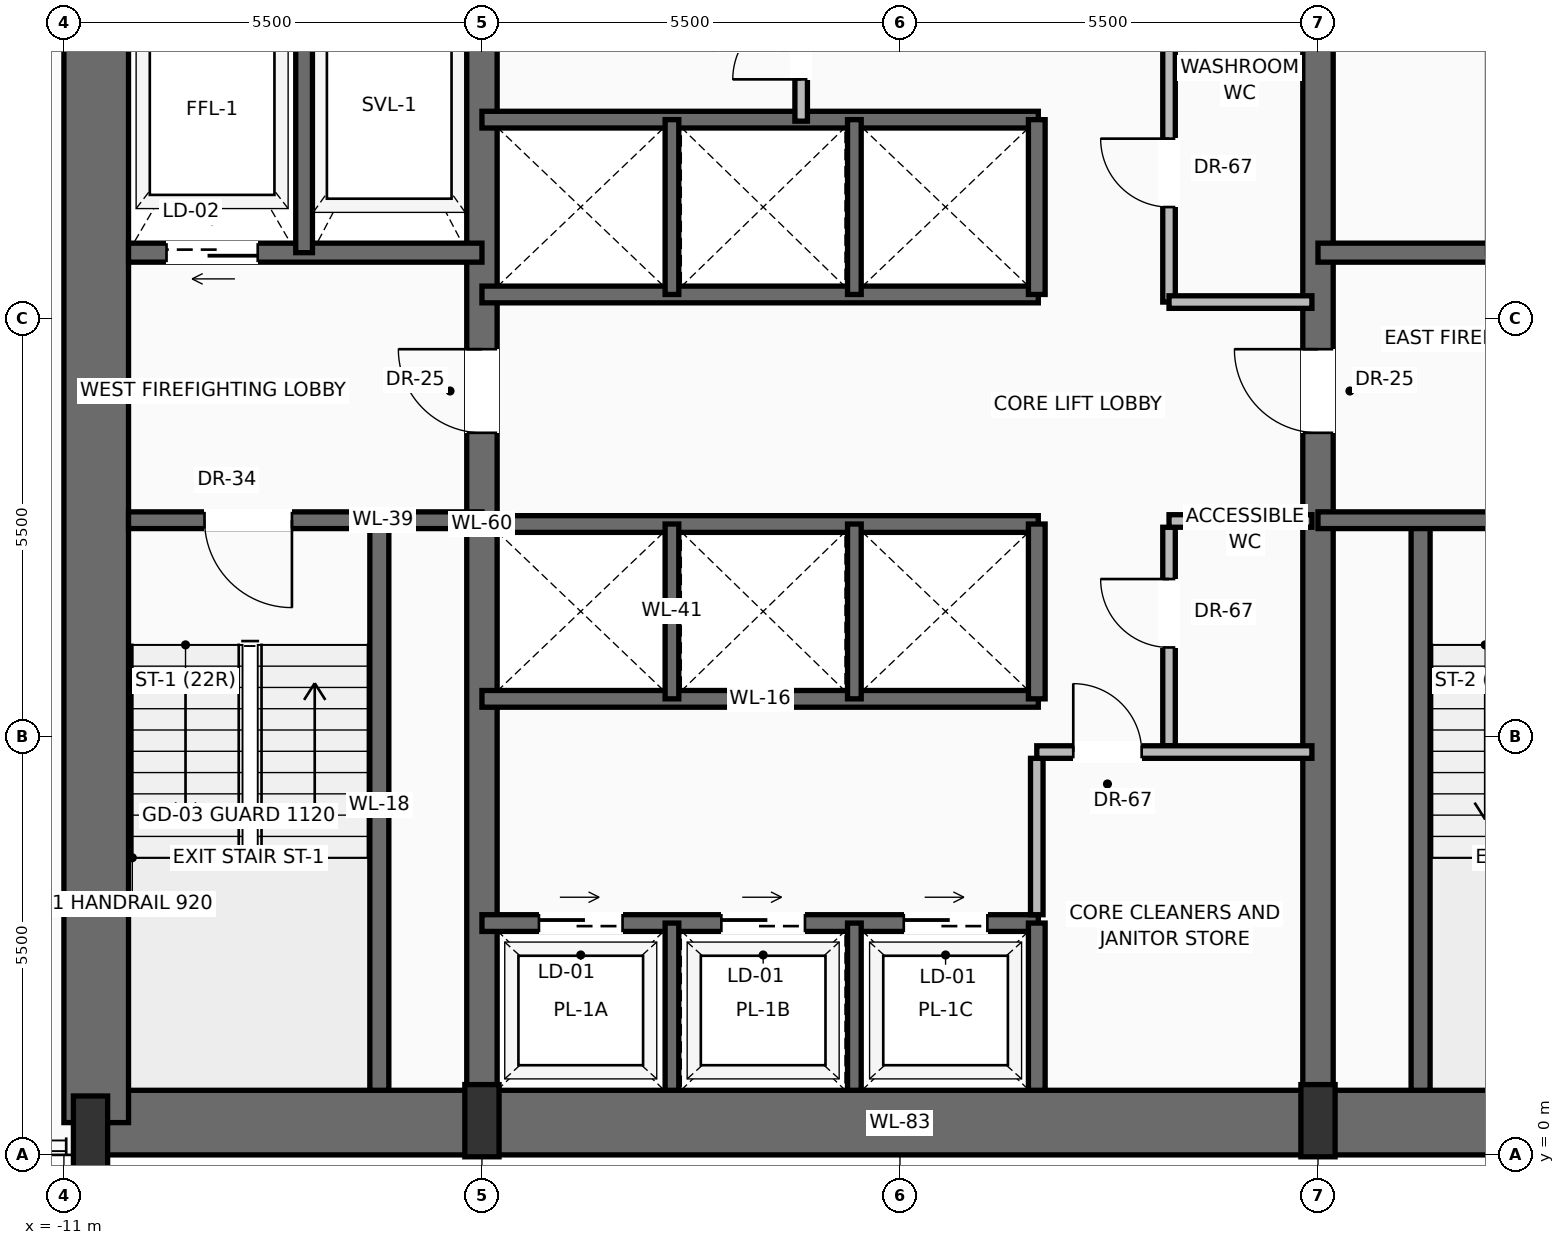
"""IFC4 building model, lengths in metres.
Left out: names, types, materials, properties, quantities, classifications, styles, units other than length and angle.
Written with IfcOpenShell. Run it as: python <this file> out.ifc"""

import sys

from ifc_helpers import new_model, si_unit, direction, frame, frame_2d, origin, origin_2d, place, context, subcontext, project, spatial, rectangle, extrude, source, transform, mapped, element, fill, save


model = new_model("IFC4")
c1 = context("Model", 3, precision=1e-05, world=origin(), true_north=direction((0.0, 1.0)))
c2 = subcontext(c1, "Body", "Model", "MODEL_VIEW")
j1 = project(units=[si_unit("LENGTHUNIT", "METRE"), si_unit("PLANEANGLEUNIT", "RADIAN")], contexts=[c1])
p1 = place(None, origin())
s1 = spatial("IfcSite", under=j1, at=p1, CompositionType="ELEMENT")
p2 = place(p1, origin())
s2 = spatial("IfcBuilding", under=s1, at=p2, CompositionType="ELEMENT")
p3 = place(p2, frame((0.0, 0.0, 53.4)))
s3 = spatial("IfcBuildingStorey", under=s2, at=p3, CompositionType="ELEMENT", Elevation=53.4)
p4 = place(p3, frame((-10.65, 0.425, 0.0), z_axis=(0.0, 0.0, 1.0), x_axis=(1.0, 0.0, 0.0)))
e1 = element("IfcWall", 1, at=p4, inside=s3, PredefinedType="SHEAR", context=c2, shape_type="SweptSolid", body=[
    extrude(rectangle(XDim=21.3, YDim=0.85, at=frame_2d((10.65, 0.0))), origin(), (0.0, 0.0, 1.0), 3.45),
])
p5 = place(p3, frame((-10.575, 0.425, 0.0), z_axis=(0.0, 0.0, 1.0), x_axis=(0.0, 1.0, 0.0)))
e2 = element("IfcWall", 2, at=p5, inside=s3, PredefinedType="SHEAR", context=c2, shape_type="SweptSolid", body=[
    extrude(rectangle(XDim=15.75, YDim=0.85, at=frame_2d((7.875, 0.0))), origin(), (0.0, 0.0, 1.0), 3.45),
])
p6 = place(p3, frame((-5.5, 0.425, 0.0), z_axis=(0.0, 0.0, 1.0), x_axis=(0.0, 1.0, 0.0)))
e3 = element("IfcWall", 3, at=p6, inside=s3, PredefinedType="SHEAR", context=c2, shape_type="SweptSolid", body=[
    extrude(rectangle(XDim=15.75, YDim=0.4, at=frame_2d((7.875, 0.0))), origin(), (0.0, 0.0, 1.0), 3.45),
])
p7 = place(p6, frame((9.075, 0.0, 0.0)))
e4 = element("IfcOpeningElement", 4, at=p7, cuts=e3, PredefinedType="OPENING", context=c2, shape_type="SweptSolid", body=[
    extrude(rectangle(XDim=1.1, YDim=2.2, at=frame_2d((0.55, 1.1))), frame((0.0, 0.21, 0.0), z_axis=(0.0, -1.0, 0.0), x_axis=(1.0, 0.0, 0.0)), (0.0, 0.0, 1.0), 0.42),
])
p8 = place(p3, frame((5.5, 0.425, 0.0), z_axis=(0.0, 0.0, 1.0), x_axis=(0.0, 1.0, 0.0)))
e5 = element("IfcWall", 5, at=p8, inside=s3, PredefinedType="SHEAR", context=c2, shape_type="SweptSolid", body=[
    extrude(rectangle(XDim=15.75, YDim=0.4, at=frame_2d((7.875, 0.0))), origin(), (0.0, 0.0, 1.0), 3.45),
])
p9 = place(p8, frame((9.075, 0.0, 0.0)))
e6 = element("IfcOpeningElement", 6, at=p9, cuts=e5, PredefinedType="OPENING", context=c2, shape_type="SweptSolid", body=[
    extrude(rectangle(XDim=1.1, YDim=2.2, at=frame_2d((0.55, 1.1))), frame((0.0, 0.21, 0.0), z_axis=(0.0, -1.0, 0.0), x_axis=(1.0, 0.0, 0.0)), (0.0, 0.0, 1.0), 0.42),
])
m1 = source(origin(), c2, "Body", "SweptSolid", [
    extrude(rectangle(XDim=0.45, YDim=0.95, at=origin_2d()), origin(), (0.0, 0.0, 1.0), 3.7),
])
for number, where, z_axis, x_axis in (
    (7, (-10.65, 0.3, 0.0), (0.0, 0.0, 1.0), (1.0, 0.0, 0.0)),
    (8, (-5.5, 0.45, 0.0), (0.0, 0.0, 1.0), (1.0, 0.0, 0.0)),
    (9, (5.5, 0.45, 0.0), (0.0, 0.0, 1.0), (1.0, 0.0, 0.0)),
):
    element("IfcColumn", number, at=place(p3, frame(where, z_axis=z_axis, x_axis=x_axis)), inside=s3, PredefinedType="PILASTER", context=c2, shape_type="MappedRepresentation", body=[
        mapped(m1, transform((0.0, 0.0, 0.0), scale=1.0)),
    ])
p10 = place(p3, frame((-6.85, 0.85, 0.0), z_axis=(0.0, 0.0, 1.0), x_axis=(0.0, 1.0, 0.0)))
e10 = element("IfcWall", 10, at=p10, inside=s3, PredefinedType="SOLIDWALL", context=c2, shape_type="SweptSolid", body=[
    extrude(rectangle(XDim=7.5, YDim=0.25, at=frame_2d((3.75, 0.0))), origin(), (0.0, 0.0, 1.0), 3.45),
])
p11 = place(p3, frame((-5.5, 8.35, 0.0), z_axis=(0.0, 0.0, 1.0), x_axis=(-1.0, 0.0, 0.0)))
e11 = element("IfcWall", 11, at=p11, inside=s3, PredefinedType="SOLIDWALL", context=c2, shape_type="SweptSolid", body=[
    extrude(rectangle(XDim=4.65, YDim=0.22, at=frame_2d((2.325, 0.0))), origin(), (0.0, 0.0, 1.0), 3.45),
])
p12 = place(p11, frame((2.5, 0.0, 0.0)))
e12 = element("IfcOpeningElement", 12, at=p12, cuts=e11, PredefinedType="OPENING", context=c2, shape_type="SweptSolid", body=[
    extrude(rectangle(XDim=1.15, YDim=2.2, at=frame_2d((0.575, 1.1))), frame((0.0, 0.12, 0.0), z_axis=(0.0, -1.0, 0.0), x_axis=(1.0, 0.0, 0.0)), (0.0, 0.0, 1.0), 0.24),
])
p13 = place(p3, frame((-5.5, 11.87, 0.0), z_axis=(0.0, 0.0, 1.0), x_axis=(-1.0, 0.0, 0.0)))
e13 = element("IfcWall", 13, at=p13, inside=s3, PredefinedType="SOLIDWALL", context=c2, shape_type="SweptSolid", body=[
    extrude(rectangle(XDim=4.65, YDim=0.25, at=frame_2d((2.325, 0.0))), origin(), (0.0, 0.0, 1.0), 3.45),
])
p14 = place(p13, frame((2.95, 0.0, 0.0)))
e14 = element("IfcOpeningElement", 14, at=p14, cuts=e13, PredefinedType="OPENING", context=c2, shape_type="SweptSolid", body=[
    extrude(rectangle(XDim=1.2, YDim=2.25, at=frame_2d((0.6, 1.125))), frame((0.0, 0.135, 0.0), z_axis=(0.0, -1.0, 0.0), x_axis=(1.0, 0.0, 0.0)), (0.0, 0.0, 1.0), 0.27),
])
p15 = place(p3, frame((-7.84, 11.87, 0.0), z_axis=(0.0, 0.0, 1.0), x_axis=(0.0, 1.0, 0.0)))
e15 = element("IfcWall", 15, at=p15, inside=s3, PredefinedType="SOLIDWALL", context=c2, shape_type="SweptSolid", body=[
    extrude(rectangle(XDim=3.88, YDim=0.22, at=frame_2d((1.94, 0.0))), origin(), (0.0, 0.0, 1.0), 3.45),
])
p16 = place(p3, frame((6.85, 0.85, 0.0), z_axis=(0.0, 0.0, 1.0), x_axis=(0.0, 1.0, 0.0)))
e16 = element("IfcWall", 16, at=p16, inside=s3, PredefinedType="SOLIDWALL", context=c2, shape_type="SweptSolid", body=[
    extrude(rectangle(XDim=7.5, YDim=0.25, at=frame_2d((3.75, 0.0))), origin(), (0.0, 0.0, 1.0), 3.45),
])
p17 = place(p3, frame((10.15, 8.35, 0.0), z_axis=(0.0, 0.0, 1.0), x_axis=(-1.0, 0.0, 0.0)))
e17 = element("IfcWall", 17, at=p17, inside=s3, PredefinedType="SOLIDWALL", context=c2, shape_type="SweptSolid", body=[
    extrude(rectangle(XDim=4.65, YDim=0.22, at=frame_2d((2.325, 0.0))), origin(), (0.0, 0.0, 1.0), 3.45),
])
p18 = place(p17, frame((1.0, 0.0, 0.0)))
e18 = element("IfcOpeningElement", 18, at=p18, cuts=e17, PredefinedType="OPENING", context=c2, shape_type="SweptSolid", body=[
    extrude(rectangle(XDim=1.15, YDim=2.2, at=frame_2d((0.575, 1.1))), frame((0.0, 0.12, 0.0), z_axis=(0.0, -1.0, 0.0), x_axis=(1.0, 0.0, 0.0)), (0.0, 0.0, 1.0), 0.24),
])
p19 = place(p3, frame((10.15, 11.87, 0.0), z_axis=(0.0, 0.0, 1.0), x_axis=(-1.0, 0.0, 0.0)))
e19 = element("IfcWall", 19, at=p19, inside=s3, PredefinedType="SOLIDWALL", context=c2, shape_type="SweptSolid", body=[
    extrude(rectangle(XDim=4.65, YDim=0.25, at=frame_2d((2.325, 0.0))), origin(), (0.0, 0.0, 1.0), 3.45),
])
p20 = place(p19, frame((0.5, 0.0, 0.0)))
e20 = element("IfcOpeningElement", 20, at=p20, cuts=e19, PredefinedType="OPENING", context=c2, shape_type="SweptSolid", body=[
    extrude(rectangle(XDim=1.2, YDim=2.25, at=frame_2d((0.6, 1.125))), frame((0.0, 0.135, 0.0), z_axis=(0.0, -1.0, 0.0), x_axis=(1.0, 0.0, 0.0)), (0.0, 0.0, 1.0), 0.27),
])
p21 = place(p3, frame((-5.5, 3.05, 0.0), z_axis=(0.0, 0.0, 1.0), x_axis=(1.0, 0.0, 0.0)))
e21 = element("IfcWall", 21, at=p21, inside=s3, PredefinedType="SOLIDWALL", context=c2, shape_type="SweptSolid", body=[
    extrude(rectangle(XDim=7.32, YDim=0.22, at=frame_2d((3.66, 0.0))), origin(), (0.0, 0.0, 1.0), 3.45),
])
p22 = place(p21, frame((0.75, 0.0, 0.0)))
e22 = element("IfcOpeningElement", 22, at=p22, cuts=e21, PredefinedType="OPENING", context=c2, shape_type="SweptSolid", body=[
    extrude(rectangle(XDim=1.1, YDim=2.2, at=frame_2d((0.55, 1.1))), frame((0.0, 0.12, 0.0), z_axis=(0.0, -1.0, 0.0), x_axis=(1.0, 0.0, 0.0)), (0.0, 0.0, 1.0), 0.24),
])
p23 = place(p21, frame((3.15, 0.0, 0.0)))
e23 = element("IfcOpeningElement", 23, at=p23, cuts=e21, PredefinedType="OPENING", context=c2, shape_type="SweptSolid", body=[
    extrude(rectangle(XDim=1.1, YDim=2.2, at=frame_2d((0.55, 1.1))), frame((0.0, 0.12, 0.0), z_axis=(0.0, -1.0, 0.0), x_axis=(1.0, 0.0, 0.0)), (0.0, 0.0, 1.0), 0.24),
])
p24 = place(p21, frame((5.55, 0.0, 0.0)))
e24 = element("IfcOpeningElement", 24, at=p24, cuts=e21, PredefinedType="OPENING", context=c2, shape_type="SweptSolid", body=[
    extrude(rectangle(XDim=1.1, YDim=2.2, at=frame_2d((0.55, 1.1))), frame((0.0, 0.12, 0.0), z_axis=(0.0, -1.0, 0.0), x_axis=(1.0, 0.0, 0.0)), (0.0, 0.0, 1.0), 0.24),
])
p25 = place(p3, frame((1.8, 0.85, 0.0), z_axis=(0.0, 0.0, 1.0), x_axis=(0.0, 1.0, 0.0)))
e25 = element("IfcWall", 25, at=p25, inside=s3, PredefinedType="SOLIDWALL", context=c2, shape_type="SweptSolid", body=[
    extrude(rectangle(XDim=2.2, YDim=0.22, at=frame_2d((1.1, 0.0))), origin(), (0.0, 0.0, 1.0), 3.45),
])
for number, where, z_axis, x_axis in (
    (26, (-3.0, 0.85, 0.0), (0.0, 0.0, 1.0), (0.0, 1.0, 0.0)),
    (27, (-0.6, 0.85, 0.0), (0.0, 0.0, 1.0), (0.0, 1.0, 0.0)),
):
    element("IfcWall", number, at=place(p3, frame(where, z_axis=z_axis, x_axis=x_axis)), inside=s3, PredefinedType="SOLIDWALL", context=c2, shape_type="SweptSolid", body=[
        extrude(rectangle(XDim=2.2, YDim=0.18, at=frame_2d((1.1, 0.0))), origin(), (0.0, 0.0, 1.0), 3.45),
    ])
p26 = place(p3, frame((1.8, 3.16, 0.0), z_axis=(0.0, 0.0, 1.0), x_axis=(0.0, 1.0, 0.0)))
e28 = element("IfcWall", 28, at=p26, inside=s3, PredefinedType="PARTITIONING", context=c2, shape_type="SweptSolid", body=[
    extrude(rectangle(XDim=2.058, YDim=0.165, at=frame_2d((1.029, 0.0))), origin(), (0.0, 0.0, 1.0), 3.442),
])
p27 = place(p3, frame((3.54, 5.383, 0.0), z_axis=(0.0, 0.0, 1.0), x_axis=(0.0, 1.0, 0.0)))
e29 = element("IfcWall", 29, at=p27, inside=s3, PredefinedType="PARTITIONING", context=c2, shape_type="SweptSolid", body=[
    extrude(rectangle(XDim=2.875, YDim=0.165, at=frame_2d((1.438, 0.0))), origin(), (0.0, 0.0, 1.0), 3.442),
])
p28 = place(p27, frame((1.294, 0.0, 0.0)))
e30 = element("IfcOpeningElement", 30, at=p28, cuts=e29, PredefinedType="OPENING", context=c2, shape_type="SweptSolid", body=[
    extrude(rectangle(XDim=0.9, YDim=2.1, at=frame_2d((0.45, 1.05))), frame((0.0, 0.093, 0.0), z_axis=(0.0, -1.0, 0.0), x_axis=(1.0, 0.0, 0.0)), (0.0, 0.0, 1.0), 0.185),
])
p29 = place(p3, frame((3.54, 8.34, 0.0), z_axis=(0.0, 0.0, 1.0), x_axis=(1.0, 0.0, 0.0)))
e31 = element("IfcWall", 31, at=p29, inside=s3, PredefinedType="PARTITIONING", context=c2, shape_type="SweptSolid", body=[
    extrude(rectangle(XDim=1.88, YDim=0.165, at=frame_2d((0.94, 0.0))), origin(), (0.0, 0.0, 1.0), 3.442),
])
p30 = place(p3, frame((1.8, 5.3, 0.0), z_axis=(0.0, 0.0, 1.0), x_axis=(1.0, 0.0, 0.0)))
e32 = element("IfcWall", 32, at=p30, inside=s3, PredefinedType="PARTITIONING", context=c2, shape_type="SweptSolid", body=[
    extrude(rectangle(XDim=3.62, YDim=0.165, at=frame_2d((1.81, 0.0))), origin(), (0.0, 0.0, 1.0), 3.442),
])
p31 = place(p30, frame((0.48, 0.0, 0.0)))
e33 = element("IfcOpeningElement", 33, at=p31, cuts=e32, PredefinedType="OPENING", context=c2, shape_type="SweptSolid", body=[
    extrude(rectangle(XDim=0.9, YDim=2.1, at=frame_2d((0.45, 1.05))), frame((0.0, 0.093, 0.0), z_axis=(0.0, -1.0, 0.0), x_axis=(1.0, 0.0, 0.0)), (0.0, 0.0, 1.0), 0.185),
])
for number, where, z_axis, x_axis in (
    (34, (-5.5, 6.0, 0.0), (0.0, 0.0, 1.0), (1.0, 0.0, 0.0)),
    (35, (-5.5, 8.3, 0.0), (0.0, 0.0, 1.0), (1.0, 0.0, 0.0)),
):
    element("IfcWall", number, at=place(p3, frame(where, z_axis=z_axis, x_axis=x_axis)), inside=s3, PredefinedType="SOLIDWALL", context=c2, shape_type="SweptSolid", body=[
        extrude(rectangle(XDim=7.32, YDim=0.22, at=frame_2d((3.66, 0.0))), origin(), (0.0, 0.0, 1.0), 3.45),
    ])
p32 = place(p3, frame((1.8, 6.0, 0.0), z_axis=(0.0, 0.0, 1.0), x_axis=(0.0, 1.0, 0.0)))
e36 = element("IfcWall", 36, at=p32, inside=s3, PredefinedType="SOLIDWALL", context=c2, shape_type="SweptSolid", body=[
    extrude(rectangle(XDim=2.3, YDim=0.22, at=frame_2d((1.15, 0.0))), origin(), (0.0, 0.0, 1.0), 3.45),
])
for number, where, z_axis, x_axis in (
    (37, (-3.0, 6.0, 0.0), (0.0, 0.0, 1.0), (0.0, 1.0, 0.0)),
    (38, (-0.6, 6.0, 0.0), (0.0, 0.0, 1.0), (0.0, 1.0, 0.0)),
):
    element("IfcWall", number, at=place(p3, frame(where, z_axis=z_axis, x_axis=x_axis)), inside=s3, PredefinedType="SOLIDWALL", context=c2, shape_type="SweptSolid", body=[
        extrude(rectangle(XDim=2.3, YDim=0.18, at=frame_2d((1.15, 0.0))), origin(), (0.0, 0.0, 1.0), 3.45),
    ])
for number, where, z_axis, x_axis in (
    (39, (-5.5, 11.32, 0.0), (0.0, 0.0, 1.0), (1.0, 0.0, 0.0)),
    (40, (-5.5, 13.62, 0.0), (0.0, 0.0, 1.0), (1.0, 0.0, 0.0)),
):
    element("IfcWall", number, at=place(p3, frame(where, z_axis=z_axis, x_axis=x_axis)), inside=s3, PredefinedType="SOLIDWALL", context=c2, shape_type="SweptSolid", body=[
        extrude(rectangle(XDim=7.32, YDim=0.22, at=frame_2d((3.66, 0.0))), origin(), (0.0, 0.0, 1.0), 3.45),
    ])
p33 = place(p3, frame((1.8, 11.32, 0.0), z_axis=(0.0, 0.0, 1.0), x_axis=(0.0, 1.0, 0.0)))
e41 = element("IfcWall", 41, at=p33, inside=s3, PredefinedType="SOLIDWALL", context=c2, shape_type="SweptSolid", body=[
    extrude(rectangle(XDim=2.3, YDim=0.22, at=frame_2d((1.15, 0.0))), origin(), (0.0, 0.0, 1.0), 3.45),
])
for number, where, z_axis, x_axis in (
    (42, (-3.0, 11.32, 0.0), (0.0, 0.0, 1.0), (0.0, 1.0, 0.0)),
    (43, (-0.6, 11.32, 0.0), (0.0, 0.0, 1.0), (0.0, 1.0, 0.0)),
):
    element("IfcWall", number, at=place(p3, frame(where, z_axis=z_axis, x_axis=x_axis)), inside=s3, PredefinedType="SOLIDWALL", context=c2, shape_type="SweptSolid", body=[
        extrude(rectangle(XDim=2.3, YDim=0.18, at=frame_2d((1.15, 0.0))), origin(), (0.0, 0.0, 1.0), 3.45),
    ])
p34 = place(p3, frame((-1.3, 13.6, 0.0), z_axis=(0.0, 0.0, 1.0), x_axis=(0.0, 1.0, 0.0)))
e44 = element("IfcWall", 44, at=p34, inside=s3, PredefinedType="PARTITIONING", context=c2, shape_type="SweptSolid", body=[
    extrude(rectangle(XDim=2.15, YDim=0.165, at=frame_2d((1.075, 0.0))), origin(), (0.0, 0.0, 1.0), 3.442),
])
p35 = place(p34, frame((0.55, 0.0, 0.0)))
e45 = element("IfcOpeningElement", 45, at=p35, cuts=e44, PredefinedType="OPENING", context=c2, shape_type="SweptSolid", body=[
    extrude(rectangle(XDim=0.9, YDim=2.1, at=frame_2d((0.45, 1.05))), frame((0.0, 0.093, 0.0), z_axis=(0.0, -1.0, 0.0), x_axis=(1.0, 0.0, 0.0)), (0.0, 0.0, 1.0), 0.185),
])
p36 = place(p3, frame((3.54, 11.22, 0.0), z_axis=(0.0, 0.0, 1.0), x_axis=(0.0, 1.0, 0.0)))
e46 = element("IfcWall", 46, at=p36, inside=s3, PredefinedType="PARTITIONING", context=c2, shape_type="SweptSolid", body=[
    extrude(rectangle(XDim=4.53, YDim=0.165, at=frame_2d((2.265, 0.0))), origin(), (0.0, 0.0, 1.0), 3.442),
])
p37 = place(p36, frame((1.25, 0.0, 0.0)))
e47 = element("IfcOpeningElement", 47, at=p37, cuts=e46, PredefinedType="OPENING", context=c2, shape_type="SweptSolid", body=[
    extrude(rectangle(XDim=0.9, YDim=2.1, at=frame_2d((0.45, 1.05))), frame((0.0, 0.093, 0.0), z_axis=(0.0, -1.0, 0.0), x_axis=(1.0, 0.0, 0.0)), (0.0, 0.0, 1.0), 0.185),
])
p38 = place(p3, frame((3.54, 11.22, 0.0), z_axis=(0.0, 0.0, 1.0), x_axis=(1.0, 0.0, 0.0)))
e48 = element("IfcWall", 48, at=p38, inside=s3, PredefinedType="PARTITIONING", context=c2, shape_type="SweptSolid", body=[
    extrude(rectangle(XDim=1.88, YDim=0.165, at=frame_2d((0.94, 0.0))), origin(), (0.0, 0.0, 1.0), 3.442),
])
m2 = source(origin(), c2, "Body", "SweptSolid", [
    extrude(rectangle(XDim=1.15, YDim=2.2, at=frame_2d((0.575, 1.1))), frame((0.0, 0.025, 0.0), z_axis=(0.0, -1.0, 0.0), x_axis=(1.0, 0.0, 0.0)), (0.0, 0.0, 1.0), 0.05),
])
p39 = place(p12, origin())
e49 = element("IfcDoor", 49, at=p39, inside=s3, OperationType="SINGLE_SWING_LEFT", PredefinedType="DOOR", context=c2, shape_type="MappedRepresentation", body=[
    mapped(m2, transform((0.0, 0.0, 0.0), scale=1.0)),
])
fill(e12, e49)
m3 = source(origin(), c2, "Body", "SweptSolid", [
    extrude(rectangle(XDim=1.1, YDim=2.2, at=frame_2d((0.55, 1.1))), frame((0.0, 0.025, 0.0), z_axis=(0.0, -1.0, 0.0), x_axis=(1.0, 0.0, 0.0)), (0.0, 0.0, 1.0), 0.05),
])
p40 = place(p7, origin())
e50 = element("IfcDoor", 50, at=p40, inside=s3, OperationType="SINGLE_SWING_RIGHT", PredefinedType="DOOR", context=c2, shape_type="MappedRepresentation", body=[
    mapped(m3, transform((0.0, 0.0, 0.0), scale=1.0)),
])
fill(e4, e50)
m4 = source(origin(), c2, "Body", "SweptSolid", [
    extrude(rectangle(XDim=1.2, YDim=2.25, at=frame_2d((0.6, 1.125))), frame((0.0, 0.025, 0.0), z_axis=(0.0, -1.0, 0.0), x_axis=(1.0, 0.0, 0.0)), (0.0, 0.0, 1.0), 0.05),
])
p41 = place(p14, origin())
e51 = element("IfcDoor", 51, at=p41, inside=s3, OperationType="SLIDING_TO_LEFT", PredefinedType="DOOR", context=c2, shape_type="MappedRepresentation", body=[
    mapped(m4, transform((0.0, 0.0, 0.0), scale=1.0)),
])
fill(e14, e51)
p42 = place(p9, origin())
e52 = element("IfcDoor", 52, at=p42, inside=s3, OperationType="SINGLE_SWING_RIGHT", PredefinedType="DOOR", context=c2, shape_type="MappedRepresentation", body=[
    mapped(m3, transform((0.0, 0.0, 0.0), scale=1.0)),
])
fill(e6, e52)
m5 = source(origin(), c2, "Body", "SweptSolid", [
    extrude(rectangle(XDim=1.1, YDim=2.2, at=frame_2d((0.55, 1.1))), frame((0.0, 0.025, 0.0), z_axis=(0.0, -1.0, 0.0), x_axis=(1.0, 0.0, 0.0)), (0.0, 0.0, 1.0), 0.05),
])
p43 = place(p22, origin())
e53 = element("IfcDoor", 53, at=p43, inside=s3, OperationType="SLIDING_TO_RIGHT", PredefinedType="DOOR", context=c2, shape_type="MappedRepresentation", body=[
    mapped(m5, transform((0.0, 0.0, 0.0), scale=1.0)),
])
fill(e22, e53)
p44 = place(p23, origin())
e54 = element("IfcDoor", 54, at=p44, inside=s3, OperationType="SLIDING_TO_RIGHT", PredefinedType="DOOR", context=c2, shape_type="MappedRepresentation", body=[
    mapped(m5, transform((0.0, 0.0, 0.0), scale=1.0)),
])
fill(e23, e54)
p45 = place(p24, origin())
e55 = element("IfcDoor", 55, at=p45, inside=s3, OperationType="SLIDING_TO_RIGHT", PredefinedType="DOOR", context=c2, shape_type="MappedRepresentation", body=[
    mapped(m5, transform((0.0, 0.0, 0.0), scale=1.0)),
])
fill(e24, e55)
m6 = source(origin(), c2, "Body", "SweptSolid", [
    extrude(rectangle(XDim=0.9, YDim=2.1, at=frame_2d((0.45, 1.05))), frame((0.0, 0.025, 0.0), z_axis=(0.0, -1.0, 0.0), x_axis=(1.0, 0.0, 0.0)), (0.0, 0.0, 1.0), 0.05),
])
p46 = place(p31, origin())
e56 = element("IfcDoor", 56, at=p46, inside=s3, OperationType="SINGLE_SWING_LEFT", PredefinedType="DOOR", context=c2, shape_type="MappedRepresentation", body=[
    mapped(m6, transform((0.0, 0.0, 0.0), scale=1.0)),
])
fill(e33, e56)
p47 = place(p28, origin())
e57 = element("IfcDoor", 57, at=p47, inside=s3, OperationType="SINGLE_SWING_RIGHT", PredefinedType="DOOR", context=c2, shape_type="MappedRepresentation", body=[
    mapped(m6, transform((0.0, 0.0, 0.0), scale=1.0)),
])
fill(e30, e57)
p48 = place(p35, origin())
e58 = element("IfcDoor", 58, at=p48, inside=s3, OperationType="SINGLE_SWING_LEFT", PredefinedType="DOOR", context=c2, shape_type="MappedRepresentation", body=[
    mapped(m6, transform((0.0, 0.0, 0.0), scale=1.0)),
])
fill(e45, e58)
p49 = place(p37, origin())
e59 = element("IfcDoor", 59, at=p49, inside=s3, OperationType="SINGLE_SWING_RIGHT", PredefinedType="DOOR", context=c2, shape_type="MappedRepresentation", body=[
    mapped(m6, transform((0.0, 0.0, 0.0), scale=1.0)),
])
fill(e47, e59)
save(model, sys.argv[1])
